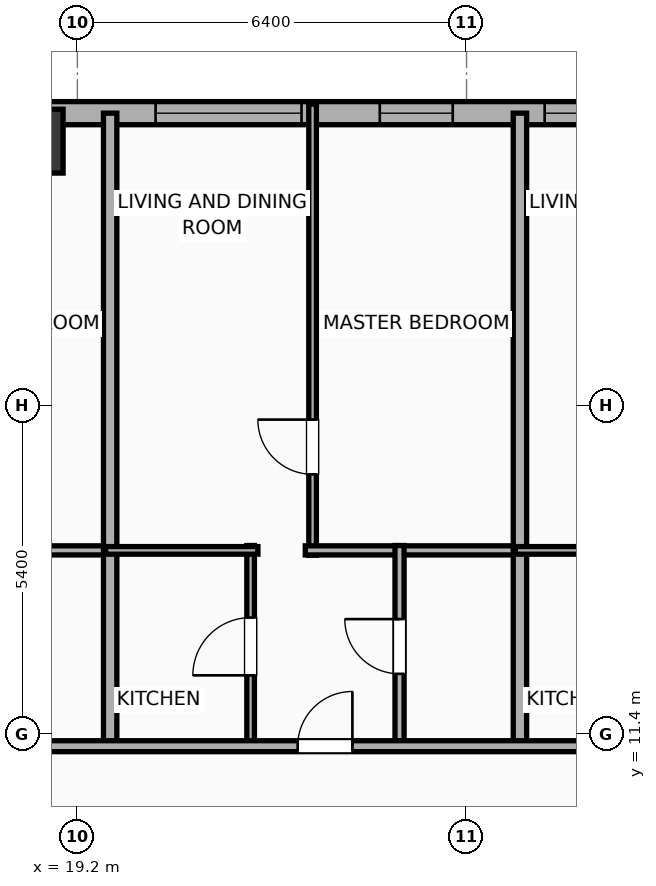
"""IFC4 building model, lengths in metres.
Left out: names, types, materials, properties, quantities, classifications, styles, units other than length and angle.
Written with IfcOpenShell. Run it as: python <this file> out.ifc"""

import sys

from ifc_helpers import new_model, si_unit, direction, frame, frame_2d, origin, origin_2d, place, context, subcontext, project, spatial, rectangle, hollow_rectangle, extrude, element, fill, save


model = new_model("IFC4")
c1 = context("Model", 3, precision=1e-05, world=origin(), true_north=direction((0.0, 1.0)))
c2 = subcontext(c1, "Body", "Model", "MODEL_VIEW")
j1 = project(units=[si_unit("LENGTHUNIT", "METRE"), si_unit("PLANEANGLEUNIT", "RADIAN")], contexts=[c1])
p1 = place(None, origin())
s1 = spatial("IfcSite", under=j1, at=p1, CompositionType="ELEMENT")
p2 = place(p1, origin())
s2 = spatial("IfcBuilding", under=s1, at=p2, CompositionType="ELEMENT")
p3 = place(p2, frame((0.0, 0.0, 120.9)))
s3 = spatial("IfcBuildingStorey", under=s2, at=p3, CompositionType="ELEMENT", Elevation=120.9)
p4 = place(p3, frame((18.44, 21.15, 0.0), z_axis=(0.0, 0.0, 1.0), x_axis=(1.0, 0.0, 0.0)))
e1 = element("IfcColumn", 1, at=p4, inside=s3, PredefinedType="COLUMN", context=c2, shape_type="SweptSolid", body=[
    extrude(hollow_rectangle(XDim=1.05, YDim=1.05, WallThickness=0.036, at=origin_2d()), origin(), (0.0, 0.0, 1.0), 3.9),
])
p5 = place(p3, frame((-25.381, 21.61, 0.0), z_axis=(0.0, 0.0, 1.0), x_axis=(1.0, 0.0, 0.0)))
e2 = element("IfcWall", 2, at=p5, inside=s3, PredefinedType="ELEMENTEDWALL", context=c2, shape_type="SweptSolid", body=[
    extrude(rectangle(XDim=54.763, YDim=0.38, at=frame_2d((27.381, 0.0))), origin(), (0.0, 0.0, 1.0), 3.65),
])
p6 = place(p5, frame((7.295, 0.0, 0.75)))
e3 = element("IfcOpeningElement", 3, at=p6, cuts=e2, PredefinedType="OPENING", context=c2, shape_type="SweptSolid", body=[
    extrude(rectangle(XDim=2.4, YDim=2.1, at=frame_2d((1.2, 1.05))), frame((0.0, 0.2, 0.0), z_axis=(0.0, -1.0, 0.0), x_axis=(1.0, 0.0, 0.0)), (0.0, 0.0, 1.0), 0.4),
])
p7 = place(p5, frame((17.686, 0.0, 0.75)))
e4 = element("IfcOpeningElement", 4, at=p7, cuts=e2, PredefinedType="OPENING", context=c2, shape_type="SweptSolid", body=[
    extrude(rectangle(XDim=2.4, YDim=2.1, at=frame_2d((1.2, 1.05))), frame((0.0, 0.2, 0.0), z_axis=(0.0, -1.0, 0.0), x_axis=(1.0, 0.0, 0.0)), (0.0, 0.0, 1.0), 0.4),
])
p8 = place(p5, frame((45.867, 0.0, 0.75)))
e5 = element("IfcOpeningElement", 5, at=p8, cuts=e2, PredefinedType="OPENING", context=c2, shape_type="SweptSolid", body=[
    extrude(rectangle(XDim=2.4, YDim=2.1, at=frame_2d((1.2, 1.05))), frame((0.0, 0.2, 0.0), z_axis=(0.0, -1.0, 0.0), x_axis=(1.0, 0.0, 0.0)), (0.0, 0.0, 1.0), 0.4),
])
p9 = place(p5, frame((1.481, 0.0, 0.75)))
e6 = element("IfcOpeningElement", 6, at=p9, cuts=e2, PredefinedType="OPENING", context=c2, shape_type="SweptSolid", body=[
    extrude(rectangle(XDim=1.2, YDim=2.05, at=frame_2d((0.6, 1.025))), frame((0.0, 0.2, 0.0), z_axis=(0.0, -1.0, 0.0), x_axis=(1.0, 0.0, 0.0)), (0.0, 0.0, 1.0), 0.4),
])
p10 = place(p5, frame((4.522, 0.0, 0.75)))
e7 = element("IfcOpeningElement", 7, at=p10, cuts=e2, PredefinedType="OPENING", context=c2, shape_type="SweptSolid", body=[
    extrude(rectangle(XDim=1.2, YDim=2.05, at=frame_2d((0.6, 1.025))), frame((0.0, 0.2, 0.0), z_axis=(0.0, -1.0, 0.0), x_axis=(1.0, 0.0, 0.0)), (0.0, 0.0, 1.0), 0.4),
])
p11 = place(p5, frame((11.696, 0.0, 0.75)))
e8 = element("IfcOpeningElement", 8, at=p11, cuts=e2, PredefinedType="OPENING", context=c2, shape_type="SweptSolid", body=[
    extrude(rectangle(XDim=1.2, YDim=2.05, at=frame_2d((0.6, 1.025))), frame((0.0, 0.2, 0.0), z_axis=(0.0, -1.0, 0.0), x_axis=(1.0, 0.0, 0.0)), (0.0, 0.0, 1.0), 0.4),
])
p12 = place(p5, frame((15.076, 0.0, 0.75)))
e9 = element("IfcOpeningElement", 9, at=p12, cuts=e2, PredefinedType="OPENING", context=c2, shape_type="SweptSolid", body=[
    extrude(rectangle(XDim=1.2, YDim=2.05, at=frame_2d((0.6, 1.025))), frame((0.0, 0.2, 0.0), z_axis=(0.0, -1.0, 0.0), x_axis=(1.0, 0.0, 0.0)), (0.0, 0.0, 1.0), 0.4),
])
p13 = place(p5, frame((22.676, 0.0, 0.75)))
e10 = element("IfcOpeningElement", 10, at=p13, cuts=e2, PredefinedType="OPENING", context=c2, shape_type="SweptSolid", body=[
    extrude(rectangle(XDim=1.2, YDim=2.05, at=frame_2d((0.6, 1.025))), frame((0.0, 0.2, 0.0), z_axis=(0.0, -1.0, 0.0), x_axis=(1.0, 0.0, 0.0)), (0.0, 0.0, 1.0), 0.4),
])
p14 = place(p5, frame((25.576, 0.0, 0.75)))
e11 = element("IfcOpeningElement", 11, at=p14, cuts=e2, PredefinedType="OPENING", context=c2, shape_type="SweptSolid", body=[
    extrude(rectangle(XDim=1.2, YDim=2.05, at=frame_2d((0.6, 1.025))), frame((0.0, 0.2, 0.0), z_axis=(0.0, -1.0, 0.0), x_axis=(1.0, 0.0, 0.0)), (0.0, 0.0, 1.0), 0.4),
])
p15 = place(p5, frame((29.076, 0.0, 0.75)))
e12 = element("IfcOpeningElement", 12, at=p15, cuts=e2, PredefinedType="OPENING", context=c2, shape_type="SweptSolid", body=[
    extrude(rectangle(XDim=1.2, YDim=2.05, at=frame_2d((0.6, 1.025))), frame((0.0, 0.2, 0.0), z_axis=(0.0, -1.0, 0.0), x_axis=(1.0, 0.0, 0.0)), (0.0, 0.0, 1.0), 0.4),
])
p16 = place(p5, frame((33.591, 0.0, 0.75)))
e13 = element("IfcOpeningElement", 13, at=p16, cuts=e2, PredefinedType="OPENING", context=c2, shape_type="SweptSolid", body=[
    extrude(rectangle(XDim=0.85, YDim=2.05, at=frame_2d((0.425, 1.025))), frame((0.0, 0.2, 0.0), z_axis=(0.0, -1.0, 0.0), x_axis=(1.0, 0.0, 0.0)), (0.0, 0.0, 1.0), 0.4),
])
p17 = place(p5, frame((36.076, 0.0, 0.75)))
e14 = element("IfcOpeningElement", 14, at=p17, cuts=e2, PredefinedType="OPENING", context=c2, shape_type="SweptSolid", body=[
    extrude(rectangle(XDim=1.2, YDim=2.05, at=frame_2d((0.6, 1.025))), frame((0.0, 0.2, 0.0), z_axis=(0.0, -1.0, 0.0), x_axis=(1.0, 0.0, 0.0)), (0.0, 0.0, 1.0), 0.4),
])
p18 = place(p5, frame((39.446, 0.0, 0.75)))
e15 = element("IfcOpeningElement", 15, at=p18, cuts=e2, PredefinedType="OPENING", context=c2, shape_type="SweptSolid", body=[
    extrude(rectangle(XDim=1.2, YDim=2.05, at=frame_2d((0.6, 1.025))), frame((0.0, 0.2, 0.0), z_axis=(0.0, -1.0, 0.0), x_axis=(1.0, 0.0, 0.0)), (0.0, 0.0, 1.0), 0.4),
])
p19 = place(p5, frame((42.27, 0.0, 0.75)))
e16 = element("IfcOpeningElement", 16, at=p19, cuts=e2, PredefinedType="OPENING", context=c2, shape_type="SweptSolid", body=[
    extrude(rectangle(XDim=0.85, YDim=2.05, at=frame_2d((0.425, 1.025))), frame((0.0, 0.2, 0.0), z_axis=(0.0, -1.0, 0.0), x_axis=(1.0, 0.0, 0.0)), (0.0, 0.0, 1.0), 0.4),
])
p20 = place(p5, frame((49.554, 0.0, 0.75)))
e17 = element("IfcOpeningElement", 17, at=p20, cuts=e2, PredefinedType="OPENING", context=c2, shape_type="SweptSolid", body=[
    extrude(rectangle(XDim=1.2, YDim=2.05, at=frame_2d((0.6, 1.025))), frame((0.0, 0.2, 0.0), z_axis=(0.0, -1.0, 0.0), x_axis=(1.0, 0.0, 0.0)), (0.0, 0.0, 1.0), 0.4),
])
p21 = place(p5, frame((52.266, 0.0, 0.75)))
e18 = element("IfcOpeningElement", 18, at=p21, cuts=e2, PredefinedType="OPENING", context=c2, shape_type="SweptSolid", body=[
    extrude(rectangle(XDim=1.2, YDim=2.05, at=frame_2d((0.6, 1.025))), frame((0.0, 0.2, 0.0), z_axis=(0.0, -1.0, 0.0), x_axis=(1.0, 0.0, 0.0)), (0.0, 0.0, 1.0), 0.4),
])
p22 = place(p3, frame((16.209, 14.42, 0.0), z_axis=(0.0, 0.0, 1.0), x_axis=(1.0, 0.0, 0.0)))
e19 = element("IfcWall", 19, at=p22, inside=s3, PredefinedType="PLUMBINGWALL", context=c2, shape_type="SweptSolid", body=[
    extrude(rectangle(XDim=3.605, YDim=0.15, at=frame_2d((1.802, 0.0))), origin(), (0.0, 0.0, 1.0), 3.65),
])
p23 = place(p3, frame((19.739, 11.12, 0.0), z_axis=(0.0, 0.0, 1.0), x_axis=(0.0, 1.0, 0.0)))
e20 = element("IfcWall", 20, at=p23, inside=s3, PredefinedType="PARTITIONING", context=c2, shape_type="SweptSolid", body=[
    extrude(rectangle(XDim=10.49, YDim=0.22, at=frame_2d((5.245, 0.0))), origin(), (0.0, 0.0, 1.0), 3.65),
])
p24 = place(p3, frame((23.068, 14.34, 0.0), z_axis=(0.0, 0.0, 1.0), x_axis=(0.0, 1.0, 0.0)))
e21 = element("IfcWall", 21, at=p24, inside=s3, PredefinedType="PARTITIONING", context=c2, shape_type="SweptSolid", body=[
    extrude(rectangle(XDim=7.42, YDim=0.125, at=frame_2d((3.71, 0.0))), origin(), (0.0, 0.0, 1.0), 3.65),
])
p25 = place(p24, frame((1.331, 0.0, 0.0)))
e22 = element("IfcOpeningElement", 22, at=p25, cuts=e21, PredefinedType="OPENING", context=c2, shape_type="SweptSolid", body=[
    extrude(rectangle(XDim=0.9, YDim=2.05, at=frame_2d((0.45, 1.025))), frame((0.0, 0.073, 0.0), z_axis=(0.0, -1.0, 0.0), x_axis=(1.0, 0.0, 0.0)), (0.0, 0.0, 1.0), 0.145),
])
p26 = place(p3, frame((22.948, 14.42, 0.0), z_axis=(0.0, 0.0, 1.0), x_axis=(1.0, 0.0, 0.0)))
e23 = element("IfcWall", 23, at=p26, inside=s3, PredefinedType="PLUMBINGWALL", context=c2, shape_type="SweptSolid", body=[
    extrude(rectangle(XDim=3.605, YDim=0.15, at=frame_2d((1.802, 0.0))), origin(), (0.0, 0.0, 1.0), 3.65),
])
p27 = place(p3, frame((22.049, 11.18, 0.0), z_axis=(0.0, 0.0, 1.0), x_axis=(0.0, 1.0, 0.0)))
e24 = element("IfcWall", 24, at=p27, inside=s3, PredefinedType="PARTITIONING", context=c2, shape_type="SweptSolid", body=[
    extrude(rectangle(XDim=3.32, YDim=0.125, at=frame_2d((1.66, 0.0))), origin(), (0.0, 0.0, 1.0), 3.65),
])
p28 = place(p27, frame((1.185, 0.0, 0.0)))
e25 = element("IfcOpeningElement", 25, at=p28, cuts=e24, PredefinedType="OPENING", context=c2, shape_type="SweptSolid", body=[
    extrude(rectangle(XDim=0.95, YDim=2.05, at=frame_2d((0.475, 1.025))), frame((0.0, 0.073, 0.0), z_axis=(0.0, -1.0, 0.0), x_axis=(1.0, 0.0, 0.0)), (0.0, 0.0, 1.0), 0.145),
])
p29 = place(p3, frame((19.664, 14.42, 0.0), z_axis=(0.0, 0.0, 1.0), x_axis=(1.0, 0.0, 0.0)))
e26 = element("IfcWall", 26, at=p29, inside=s3, PredefinedType="PARTITIONING", context=c2, shape_type="SweptSolid", body=[
    extrude(rectangle(XDim=2.505, YDim=0.125, at=frame_2d((1.252, 0.0))), origin(), (0.0, 0.0, 1.0), 3.65),
])
p30 = place(p3, frame((24.498, 11.18, 0.0), z_axis=(0.0, 0.0, 1.0), x_axis=(0.0, 1.0, 0.0)))
e27 = element("IfcWall", 27, at=p30, inside=s3, PredefinedType="PLUMBINGWALL", context=c2, shape_type="SweptSolid", body=[
    extrude(rectangle(XDim=3.32, YDim=0.15, at=frame_2d((1.66, 0.0))), origin(), (0.0, 0.0, 1.0), 3.65),
])
p31 = place(p30, frame((1.21, 0.0, 0.0)))
e28 = element("IfcOpeningElement", 28, at=p31, cuts=e27, PredefinedType="OPENING", context=c2, shape_type="SweptSolid", body=[
    extrude(rectangle(XDim=0.9, YDim=2.05, at=frame_2d((0.45, 1.025))), frame((0.0, 0.085, 0.0), z_axis=(0.0, -1.0, 0.0), x_axis=(1.0, 0.0, 0.0)), (0.0, 0.0, 1.0), 0.17),
])
p32 = place(p3, frame((26.478, 11.12, 0.0), z_axis=(0.0, 0.0, 1.0), x_axis=(0.0, 1.0, 0.0)))
e29 = element("IfcWall", 29, at=p32, inside=s3, PredefinedType="PARTITIONING", context=c2, shape_type="SweptSolid", body=[
    extrude(rectangle(XDim=10.49, YDim=0.22, at=frame_2d((5.245, 0.0))), origin(), (0.0, 0.0, 1.0), 3.65),
])
p33 = place(p3, frame((26.403, 14.42, 0.0), z_axis=(0.0, 0.0, 1.0), x_axis=(1.0, 0.0, 0.0)))
e30 = element("IfcWall", 30, at=p33, inside=s3, PredefinedType="PARTITIONING", context=c2, shape_type="SweptSolid", body=[
    extrude(rectangle(XDim=2.505, YDim=0.125, at=frame_2d((1.252, 0.0))), origin(), (0.0, 0.0, 1.0), 3.65),
])
p34 = place(p3, frame((-29.21, 11.2, 0.0), z_axis=(0.0, 0.0, 1.0), x_axis=(1.0, 0.0, 0.0)))
e31 = element("IfcWall", 31, at=p34, inside=s3, PredefinedType="PARTITIONING", context=c2, shape_type="SweptSolid", body=[
    extrude(rectangle(XDim=62.42, YDim=0.18, at=frame_2d((31.21, 0.0))), origin(), (0.0, 0.0, 1.0), 3.65),
])
p35 = place(p34, frame((3.108, 0.0, 0.0)))
e32 = element("IfcOpeningElement", 32, at=p35, cuts=e31, PredefinedType="OPENING", context=c2, shape_type="SweptSolid", body=[
    extrude(rectangle(XDim=1.15, YDim=2.05, at=frame_2d((0.575, 1.025))), frame((0.0, 0.1, 0.0), z_axis=(0.0, -1.0, 0.0), x_axis=(1.0, 0.0, 0.0)), (0.0, 0.0, 1.0), 0.2),
])
p36 = place(p34, frame((10.242, 0.0, 0.0)))
e33 = element("IfcOpeningElement", 33, at=p36, cuts=e31, PredefinedType="OPENING", context=c2, shape_type="SweptSolid", body=[
    extrude(rectangle(XDim=1.15, YDim=2.05, at=frame_2d((0.575, 1.025))), frame((0.0, 0.1, 0.0), z_axis=(0.0, -1.0, 0.0), x_axis=(1.0, 0.0, 0.0)), (0.0, 0.0, 1.0), 0.2),
])
p37 = place(p34, frame((17.427, 0.0, 0.0)))
e34 = element("IfcOpeningElement", 34, at=p37, cuts=e31, PredefinedType="OPENING", context=c2, shape_type="SweptSolid", body=[
    extrude(rectangle(XDim=0.9, YDim=2.05, at=frame_2d((0.45, 1.025))), frame((0.0, 0.1, 0.0), z_axis=(0.0, -1.0, 0.0), x_axis=(1.0, 0.0, 0.0)), (0.0, 0.0, 1.0), 0.2),
])
p38 = place(p34, frame((24.424, 0.0, 0.0)))
e35 = element("IfcOpeningElement", 35, at=p38, cuts=e31, PredefinedType="OPENING", context=c2, shape_type="SweptSolid", body=[
    extrude(rectangle(XDim=0.9, YDim=2.05, at=frame_2d((0.45, 1.025))), frame((0.0, 0.1, 0.0), z_axis=(0.0, -1.0, 0.0), x_axis=(1.0, 0.0, 0.0)), (0.0, 0.0, 1.0), 0.2),
])
p39 = place(p34, frame((31.428, 0.0, 0.0)))
e36 = element("IfcOpeningElement", 36, at=p39, cuts=e31, PredefinedType="OPENING", context=c2, shape_type="SweptSolid", body=[
    extrude(rectangle(XDim=0.9, YDim=2.05, at=frame_2d((0.45, 1.025))), frame((0.0, 0.1, 0.0), z_axis=(0.0, -1.0, 0.0), x_axis=(1.0, 0.0, 0.0)), (0.0, 0.0, 1.0), 0.2),
])
p40 = place(p34, frame((38.425, 0.0, 0.0)))
e37 = element("IfcOpeningElement", 37, at=p40, cuts=e31, PredefinedType="OPENING", context=c2, shape_type="SweptSolid", body=[
    extrude(rectangle(XDim=0.9, YDim=2.05, at=frame_2d((0.45, 1.025))), frame((0.0, 0.1, 0.0), z_axis=(0.0, -1.0, 0.0), x_axis=(1.0, 0.0, 0.0)), (0.0, 0.0, 1.0), 0.2),
])
p41 = place(p34, frame((45.298, 0.0, 0.0)))
e38 = element("IfcOpeningElement", 38, at=p41, cuts=e31, PredefinedType="OPENING", context=c2, shape_type="SweptSolid", body=[
    extrude(rectangle(XDim=0.9, YDim=2.05, at=frame_2d((0.45, 1.025))), frame((0.0, 0.1, 0.0), z_axis=(0.0, -1.0, 0.0), x_axis=(1.0, 0.0, 0.0)), (0.0, 0.0, 1.0), 0.2),
])
p42 = place(p34, frame((52.033, 0.0, 0.0)))
e39 = element("IfcOpeningElement", 39, at=p42, cuts=e31, PredefinedType="OPENING", context=c2, shape_type="SweptSolid", body=[
    extrude(rectangle(XDim=0.9, YDim=2.05, at=frame_2d((0.45, 1.025))), frame((0.0, 0.1, 0.0), z_axis=(0.0, -1.0, 0.0), x_axis=(1.0, 0.0, 0.0)), (0.0, 0.0, 1.0), 0.2),
])
p43 = place(p34, frame((58.805, 0.0, 0.0)))
e40 = element("IfcOpeningElement", 40, at=p43, cuts=e31, PredefinedType="OPENING", context=c2, shape_type="SweptSolid", body=[
    extrude(rectangle(XDim=0.9, YDim=2.05, at=frame_2d((0.45, 1.025))), frame((0.0, 0.1, 0.0), z_axis=(0.0, -1.0, 0.0), x_axis=(1.0, 0.0, 0.0)), (0.0, 0.0, 1.0), 0.2),
])
p44 = place(p8, origin())
e41 = element("IfcWindow", 41, at=p44, inside=s3, PartitioningType="SINGLE_PANEL", PredefinedType="WINDOW", context=c2, shape_type="SweptSolid", body=[
    extrude(rectangle(XDim=2.4, YDim=2.1, at=frame_2d((1.2, 1.05))), frame((0.0, 0.03, 0.0), z_axis=(0.0, -1.0, 0.0), x_axis=(1.0, 0.0, 0.0)), (0.0, 0.0, 1.0), 0.06),
])
fill(e5, e41)
p45 = place(p20, origin())
e42 = element("IfcWindow", 42, at=p45, inside=s3, PartitioningType="SINGLE_PANEL", PredefinedType="WINDOW", context=c2, shape_type="SweptSolid", body=[
    extrude(rectangle(XDim=1.2, YDim=2.05, at=frame_2d((0.6, 1.025))), frame((0.0, 0.03, 0.0), z_axis=(0.0, -1.0, 0.0), x_axis=(1.0, 0.0, 0.0)), (0.0, 0.0, 1.0), 0.06),
])
fill(e17, e42)
p46 = place(p21, origin())
e43 = element("IfcWindow", 43, at=p46, inside=s3, PartitioningType="SINGLE_PANEL", PredefinedType="WINDOW", context=c2, shape_type="SweptSolid", body=[
    extrude(rectangle(XDim=1.2, YDim=2.05, at=frame_2d((0.6, 1.025))), frame((0.0, 0.03, 0.0), z_axis=(0.0, -1.0, 0.0), x_axis=(1.0, 0.0, 0.0)), (0.0, 0.0, 1.0), 0.06),
])
fill(e18, e43)
p47 = place(p25, origin())
e44 = element("IfcDoor", 44, at=p47, inside=s3, OperationType="SINGLE_SWING_RIGHT", PredefinedType="DOOR", context=c2, shape_type="SweptSolid", body=[
    extrude(rectangle(XDim=0.9, YDim=2.05, at=frame_2d((0.45, 1.025))), frame((0.0, 0.025, 0.0), z_axis=(0.0, -1.0, 0.0), x_axis=(1.0, 0.0, 0.0)), (0.0, 0.0, 1.0), 0.05),
])
fill(e22, e44)
p48 = place(p28, origin())
e45 = element("IfcDoor", 45, at=p48, inside=s3, OperationType="SINGLE_SWING_LEFT", PredefinedType="DOOR", context=c2, shape_type="SweptSolid", body=[
    extrude(rectangle(XDim=0.95, YDim=2.05, at=frame_2d((0.475, 1.025))), frame((0.0, 0.025, 0.0), z_axis=(0.0, -1.0, 0.0), x_axis=(1.0, 0.0, 0.0)), (0.0, 0.0, 1.0), 0.05),
])
fill(e25, e45)
p49 = place(p31, origin())
e46 = element("IfcDoor", 46, at=p49, inside=s3, OperationType="SINGLE_SWING_RIGHT", PredefinedType="DOOR", context=c2, shape_type="SweptSolid", body=[
    extrude(rectangle(XDim=0.9, YDim=2.05, at=frame_2d((0.45, 1.025))), frame((0.0, 0.025, 0.0), z_axis=(0.0, -1.0, 0.0), x_axis=(1.0, 0.0, 0.0)), (0.0, 0.0, 1.0), 0.05),
])
fill(e28, e46)
p50 = place(p42, origin())
e47 = element("IfcDoor", 47, at=p50, inside=s3, OperationType="SINGLE_SWING_RIGHT", PredefinedType="DOOR", context=c2, shape_type="SweptSolid", body=[
    extrude(rectangle(XDim=0.9, YDim=2.05, at=frame_2d((0.45, 1.025))), frame((0.0, 0.025, 0.0), z_axis=(0.0, -1.0, 0.0), x_axis=(1.0, 0.0, 0.0)), (0.0, 0.0, 1.0), 0.05),
])
fill(e39, e47)
save(model, sys.argv[1])
